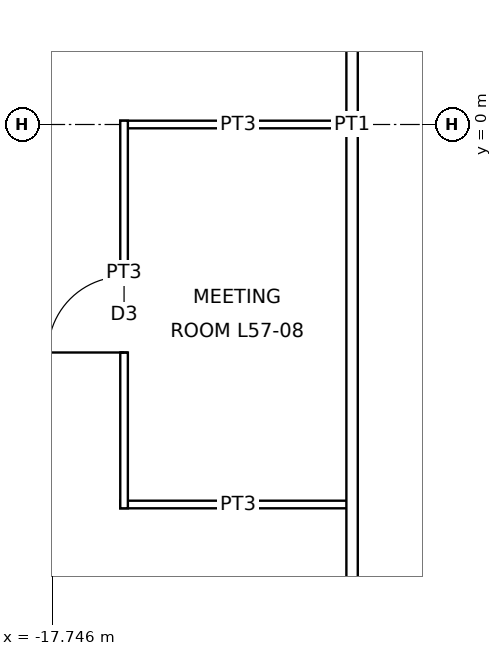
"""IFC4 building model, lengths in metres.
Left out: names, types, materials, properties, quantities, classifications, styles, units other than length and angle.
Written with IfcOpenShell. Run it as: python <this file> out.ifc"""

import sys

from ifc_helpers import new_model, si_unit, direction, frame, frame_2d, origin, place, context, subcontext, project, spatial, rectangle, extrude, element, fill, save


model = new_model("IFC4")
c1 = context("Model", 3, precision=1e-05, world=origin(), true_north=direction((0.0, 1.0)))
c2 = subcontext(c1, "Body", "Model", "MODEL_VIEW")
j1 = project(units=[si_unit("LENGTHUNIT", "METRE"), si_unit("PLANEANGLEUNIT", "RADIAN")], contexts=[c1])
p1 = place(None, origin())
s1 = spatial("IfcSite", under=j1, at=p1, CompositionType="ELEMENT")
p2 = place(p1, origin())
s2 = spatial("IfcBuilding", under=s1, at=p2, CompositionType="ELEMENT")
p3 = place(p2, frame((0.0, 0.0, 263.9)))
s3 = spatial("IfcBuildingStorey", under=s2, at=p3, CompositionType="ELEMENT", Elevation=263.9)
p4 = place(p3, frame((-16.85, -5.0, 0.0), z_axis=(0.0, 0.0, 1.0), x_axis=(1.0, 0.0, 0.0)))
e1 = element("IfcWall", 1, at=p4, inside=s3, PredefinedType="PARTITIONING", context=c2, shape_type="SweptSolid", body=[
    extrude(rectangle(XDim=3.1, YDim=0.1, at=frame_2d((1.55, 0.0))), origin(), (0.0, 0.0, 1.0), 3.85),
])
p5 = place(p3, frame((-16.85, 0.0, 0.0), z_axis=(0.0, 0.0, 1.0), x_axis=(1.0, 0.0, 0.0)))
e2 = element("IfcWall", 2, at=p5, inside=s3, PredefinedType="PARTITIONING", context=c2, shape_type="SweptSolid", body=[
    extrude(rectangle(XDim=3.1, YDim=0.1, at=frame_2d((1.55, 0.0))), origin(), (0.0, 0.0, 1.0), 3.243),
])
p6 = place(p3, frame((-16.8, -5.05, 0.0), z_axis=(0.0, 0.0, 1.0), x_axis=(0.0, 1.0, 0.0)))
e3 = element("IfcWall", 3, at=p6, inside=s3, PredefinedType="PARTITIONING", context=c2, shape_type="SweptSolid", body=[
    extrude(rectangle(XDim=5.1, YDim=0.1, at=frame_2d((2.55, 0.0))), origin(), (0.0, 0.0, 1.0), 3.85),
])
p7 = place(p6, frame((2.05, 0.0, 0.0)))
e4 = element("IfcOpeningElement", 4, at=p7, cuts=e3, PredefinedType="OPENING", context=c2, shape_type="SweptSolid", body=[
    extrude(rectangle(XDim=1.0, YDim=2.1, at=frame_2d((0.5, 1.05))), frame((0.0, 0.06, 0.0), z_axis=(0.0, -1.0, 0.0), x_axis=(1.0, 0.0, 0.0)), (0.0, 0.0, 1.0), 0.12),
])
p8 = place(p3, frame((-13.8, -13.875, 0.0), z_axis=(0.0, 0.0, 1.0), x_axis=(0.0, 1.0, 0.0)))
e5 = element("IfcWall", 5, at=p8, inside=s3, PredefinedType="PARTITIONING", context=c2, shape_type="SweptSolid", body=[
    extrude(rectangle(XDim=27.75, YDim=0.15, at=frame_2d((13.875, 0.0))), origin(), (0.0, 0.0, 1.0), 3.85),
])
p9 = place(p7, origin())
e6 = element("IfcDoor", 6, at=p9, inside=s3, OperationType="SINGLE_SWING_LEFT", PredefinedType="DOOR", context=c2, shape_type="SweptSolid", body=[
    extrude(rectangle(XDim=1.0, YDim=2.1, at=frame_2d((0.5, 1.05))), frame((0.0, 0.025, 0.0), z_axis=(0.0, -1.0, 0.0), x_axis=(1.0, 0.0, 0.0)), (0.0, 0.0, 1.0), 0.05),
])
fill(e4, e6)
save(model, sys.argv[1])
